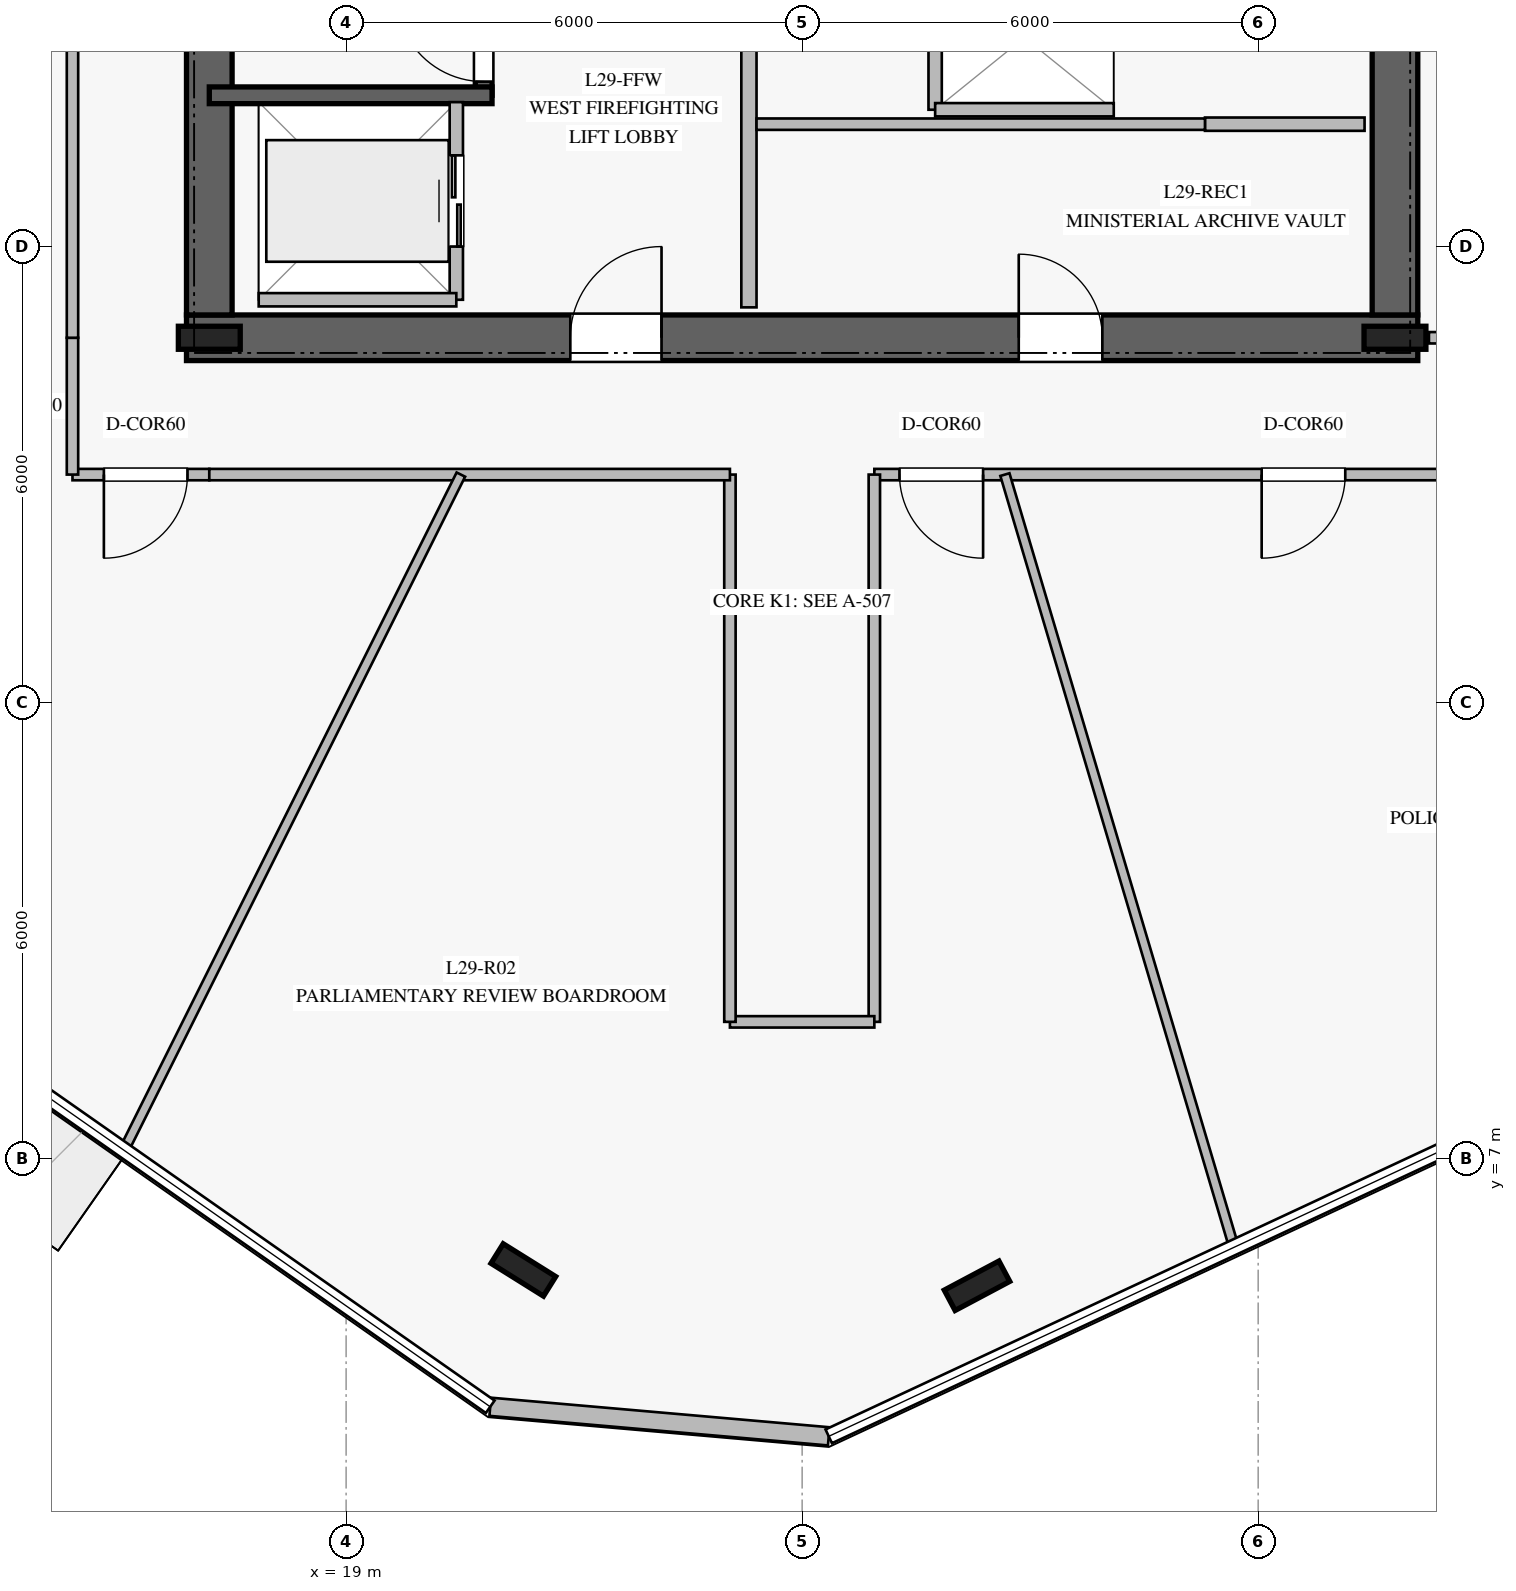
"""IFC4 building model, lengths in metres.
Left out: names, types, materials, properties, quantities, classifications, styles, units other than length and angle.
Written with IfcOpenShell. Run it as: python <this file> out.ifc"""

import sys

from ifc_helpers import new_model, si_unit, direction, frame, frame_2d, origin, origin_2d, place, context, subcontext, project, spatial, rectangle, i_section, extrude, element, fill, save


model = new_model("IFC4")
c1 = context("Model", 3, precision=1e-05, world=origin(), true_north=direction((0.0, 1.0)))
c2 = subcontext(c1, "Body", "Model", "MODEL_VIEW")
j1 = project(units=[si_unit("LENGTHUNIT", "METRE"), si_unit("PLANEANGLEUNIT", "RADIAN")], contexts=[c1])
p1 = place(None, origin())
s1 = spatial("IfcSite", under=j1, at=p1, CompositionType="ELEMENT")
p2 = place(p1, origin())
s2 = spatial("IfcBuilding", under=s1, at=p2, CompositionType="ELEMENT")
p3 = place(p2, frame((0.0, 0.0, 122.4)))
s3 = spatial("IfcBuildingStorey", under=s2, at=p3, CompositionType="ELEMENT", Elevation=122.4)
p4 = place(p3, frame((16.9, 17.8, 0.0), z_axis=(0.0, 0.0, 1.0), x_axis=(1.0, 0.0, 0.0)))
e1 = element("IfcWall", 1, at=p4, inside=s3, PredefinedType="SHEAR", context=c2, shape_type="SweptSolid", body=[
    extrude(rectangle(XDim=16.2, YDim=0.6, at=frame_2d((8.1, 0.0))), origin(), (0.0, 0.0, 1.0), 3.76),
])
p5 = place(p4, frame((5.05, 0.0, 0.0)))
e2 = element("IfcOpeningElement", 2, at=p5, cuts=e1, PredefinedType="OPENING", context=c2, shape_type="SweptSolid", body=[
    extrude(rectangle(XDim=1.2, YDim=2.25, at=frame_2d((0.6, 1.125))), frame((0.0, 0.31, 0.0), z_axis=(0.0, -1.0, 0.0), x_axis=(1.0, 0.0, 0.0)), (0.0, 0.0, 1.0), 0.62),
])
p6 = place(p4, frame((10.95, 0.0, 0.0)))
e3 = element("IfcOpeningElement", 3, at=p6, cuts=e1, PredefinedType="OPENING", context=c2, shape_type="SweptSolid", body=[
    extrude(rectangle(XDim=1.1, YDim=2.2, at=frame_2d((0.55, 1.1))), frame((0.0, 0.31, 0.0), z_axis=(0.0, -1.0, 0.0), x_axis=(1.0, 0.0, 0.0)), (0.0, 0.0, 1.0), 0.62),
])
p7 = place(p3, frame((17.2, 31.9, 0.0), z_axis=(0.0, 0.0, 1.0), x_axis=(0.0, -1.0, 0.0)))
e4 = element("IfcWall", 4, at=p7, inside=s3, PredefinedType="SHEAR", context=c2, shape_type="SweptSolid", body=[
    extrude(rectangle(XDim=13.8, YDim=0.6, at=frame_2d((6.9, 0.0))), origin(), (0.0, 0.0, 1.0), 3.76),
])
p8 = place(p7, frame((2.05, 0.0, 0.0)))
e5 = element("IfcOpeningElement", 5, at=p8, cuts=e4, PredefinedType="OPENING", context=c2, shape_type="SweptSolid", body=[
    extrude(rectangle(XDim=1.5, YDim=2.2, at=frame_2d((0.75, 1.1))), frame((0.0, 0.31, 0.0), z_axis=(0.0, -1.0, 0.0), x_axis=(1.0, 0.0, 0.0)), (0.0, 0.0, 1.0), 0.62),
])
p9 = place(p3, frame((32.8, 18.1, 0.0), z_axis=(0.0, 0.0, 1.0), x_axis=(0.0, 1.0, 0.0)))
e6 = element("IfcWall", 6, at=p9, inside=s3, PredefinedType="SHEAR", context=c2, shape_type="SweptSolid", body=[
    extrude(rectangle(XDim=13.8, YDim=0.6, at=frame_2d((6.9, 0.0))), origin(), (0.0, 0.0, 1.0), 3.76),
])
for number, where, z_axis, x_axis in (
    (7, (17.2, 17.8, 0.0), (0.0, 0.0, 1.0), (1.0, 0.0, 0.0)),
    (8, (32.8, 17.8, 0.0), (0.0, 0.0, 1.0), (1.0, 0.0, 0.0)),
):
    element("IfcColumn", number, at=place(p3, frame(where, z_axis=z_axis, x_axis=x_axis)), inside=s3, PredefinedType="COLUMN", context=c2, shape_type="SweptSolid", body=[
        extrude(i_section(OverallWidth=0.303, OverallDepth=0.814, WebThickness=0.021, FlangeThickness=0.04, at=origin_2d()), origin(), (0.0, 0.0, 1.0), 4.0),
    ])
p10 = place(p3, frame((20.81, 20.99, 0.0), z_axis=(0.0, 0.0, 1.0), x_axis=(0.0, 1.0, 0.0)))
e9 = element("IfcWall", 9, at=p10, inside=s3, PredefinedType="SOLIDWALL", context=c2, shape_type="SweptSolid", body=[
    extrude(rectangle(XDim=7.22, YDim=0.22, at=frame_2d((3.61, 0.0))), origin(), (0.0, 0.0, 1.0), 3.76),
])
p11 = place(p10, frame((0.18, 0.0, 0.0)))
e10 = element("IfcOpeningElement", 10, at=p11, cuts=e9, PredefinedType="OPENING", context=c2, shape_type="SweptSolid", body=[
    extrude(rectangle(XDim=1.15, YDim=2.2, at=frame_2d((0.575, 1.1))), frame((0.0, 0.12, 0.0), z_axis=(0.0, -1.0, 0.0), x_axis=(1.0, 0.0, 0.0)), (0.0, 0.0, 1.0), 0.24),
])
p12 = place(p3, frame((17.2, 20.99, 0.0), z_axis=(0.0, 0.0, 1.0), x_axis=(1.0, 0.0, 0.0)))
e11 = element("IfcWall", 11, at=p12, inside=s3, PredefinedType="SOLIDWALL", context=c2, shape_type="SweptSolid", body=[
    extrude(rectangle(XDim=3.72, YDim=0.22, at=frame_2d((1.86, 0.0))), origin(), (0.0, 0.0, 1.0), 3.76),
])
for number, where, z_axis, x_axis in (
    (12, (21.332, 5.536, 0.0), (0.0, 0.0, 1.0), (-0.848, 0.53, 0.0)),
    (13, (27.301, 5.328, 0.0), (0.0, 0.0, 1.0), (0.883, 0.469, 0.0)),
):
    element("IfcColumn", number, at=place(p3, frame(where, z_axis=z_axis, x_axis=x_axis)), inside=s3, PredefinedType="COLUMN", context=c2, shape_type="SweptSolid", body=[
        extrude(i_section(OverallWidth=0.303, OverallDepth=0.814, WebThickness=0.021, FlangeThickness=0.04, at=origin_2d()), origin(), (0.0, 0.0, 1.0), 4.0),
    ])
p13 = place(p3, frame((20.896, 3.736, 0.0), z_axis=(0.0, 0.0, 1.0), x_axis=(0.996204852099, -0.087039603938, 0.0)))
e14 = element("IfcWall", 14, at=p13, inside=s3, PredefinedType="STANDARD", context=c2, shape_type="SweptSolid", body=[
    extrude(rectangle(XDim=4.471, YDim=0.24, at=frame_2d((2.236, 0.0))), origin(), (0.0, 0.0, 1.0), 3.76),
])
p14 = place(p3, frame((24.3, 18.2, 0.0), z_axis=(0.0, 0.0, 1.0), x_axis=(0.0, 1.0, 0.0)))
e15 = element("IfcWall", 15, at=p14, inside=s3, PredefinedType="PARTITIONING", context=c2, shape_type="SweptSolid", body=[
    extrude(rectangle(XDim=5.15, YDim=0.2, at=frame_2d((2.575, 0.0))), origin(), (0.0, 0.0, 1.0), 3.76),
])
p15 = place(p3, frame((30.3, 20.61, 0.0), z_axis=(0.0, 0.0, 1.0), x_axis=(1.0, 0.0, 0.0)))
e16 = element("IfcWall", 16, at=p15, inside=s3, PredefinedType="PARTITIONING", context=c2, shape_type="SweptSolid", body=[
    extrude(rectangle(XDim=2.1, YDim=0.175, at=frame_2d((1.05, 0.0))), origin(), (0.0, 0.0, 1.0), 3.76),
])
p16 = place(p3, frame((24.4, 20.61, 0.0), z_axis=(0.0, 0.0, 1.0), x_axis=(1.0, 0.0, 0.0)))
e17 = element("IfcWall", 17, at=p16, inside=s3, PredefinedType="PARTITIONING", context=c2, shape_type="SweptSolid", body=[
    extrude(rectangle(XDim=5.9, YDim=0.15, at=frame_2d((2.95, 0.0))), origin(), (0.0, 0.0, 1.0), 3.76),
])
p17 = place(p3, frame((26.75, 20.8, 0.0), z_axis=(0.0, 0.0, 1.0), x_axis=(0.0, 1.0, 0.0)))
e18 = element("IfcWall", 18, at=p17, inside=s3, PredefinedType="PARTITIONING", context=c2, shape_type="SweptSolid", body=[
    extrude(rectangle(XDim=1.9, YDim=0.175, at=frame_2d((0.95, 0.0))), origin(), (0.0, 0.0, 1.0), 3.76),
])
p18 = place(p3, frame((26.75, 20.8, 0.0), z_axis=(0.0, 0.0, 1.0), x_axis=(1.0, 0.0, 0.0)))
e19 = element("IfcWall", 19, at=p18, inside=s3, PredefinedType="PARTITIONING", context=c2, shape_type="SweptSolid", body=[
    extrude(rectangle(XDim=2.35, YDim=0.175, at=frame_2d((1.175, 0.0))), origin(), (0.0, 0.0, 1.0), 3.76),
])
p19 = place(p3, frame((20.45, 18.3, 0.0), z_axis=(0.0, 0.0, 1.0), x_axis=(0.0, 1.0, 0.0)))
e20 = element("IfcWall", 20, at=p19, inside=s3, PredefinedType="PARTITIONING", context=c2, shape_type="SweptSolid", body=[
    extrude(rectangle(XDim=2.6, YDim=0.175, at=frame_2d((1.3, 0.0))), origin(), (0.0, 0.0, 1.0), 3.76),
])
p20 = place(p19, frame((0.7, 0.0, 0.0)))
e21 = element("IfcOpeningElement", 21, at=p20, cuts=e20, PredefinedType="OPENING", context=c2, shape_type="SweptSolid", body=[
    extrude(rectangle(XDim=1.2, YDim=2.2, at=frame_2d((0.6, 1.1))), frame((0.0, 0.098, 0.0), z_axis=(0.0, -1.0, 0.0), x_axis=(1.0, 0.0, 0.0)), (0.0, 0.0, 1.0), 0.195),
])
p21 = place(p3, frame((17.85, 18.3, 0.0), z_axis=(0.0, 0.0, 1.0), x_axis=(1.0, 0.0, 0.0)))
e22 = element("IfcWall", 22, at=p21, inside=s3, PredefinedType="PARTITIONING", context=c2, shape_type="SweptSolid", body=[
    extrude(rectangle(XDim=2.6, YDim=0.175, at=frame_2d((1.3, 0.0))), origin(), (0.0, 0.0, 1.0), 3.76),
])
p22 = place(p3, frame((17.2, 16.0, 0.0), z_axis=(0.0, 0.0, 1.0), x_axis=(-1.0, 0.0, 0.0)))
e23 = element("IfcWall", 23, at=p22, inside=s3, PredefinedType="PARTITIONING", context=c2, shape_type="SweptSolid", body=[
    extrude(rectangle(XDim=1.8, YDim=0.15, at=frame_2d((0.9, 0.0))), origin(), (0.0, 0.0, 1.0), 3.36),
])
p23 = place(p22, frame((0.287, 0.0, 0.0)))
e24 = element("IfcOpeningElement", 24, at=p23, cuts=e23, PredefinedType="OPENING", context=c2, shape_type="SweptSolid", body=[
    extrude(rectangle(XDim=1.1, YDim=2.2, at=frame_2d((0.55, 1.1))), frame((0.0, 0.085, 0.0), z_axis=(0.0, -1.0, 0.0), x_axis=(1.0, 0.0, 0.0)), (0.0, 0.0, 1.0), 0.17),
])
p24 = place(p3, frame((15.4, 16.0, 0.0), z_axis=(0.0, 0.0, 1.0), x_axis=(0.0, 1.0, 0.0)))
e25 = element("IfcWall", 25, at=p24, inside=s3, PredefinedType="PARTITIONING", context=c2, shape_type="SweptSolid", body=[
    extrude(rectangle(XDim=1.8, YDim=0.15, at=frame_2d((0.9, 0.0))), origin(), (0.0, 0.0, 1.0), 3.21),
])
p25 = place(p3, frame((15.4, 17.8, 0.0), z_axis=(0.0, 0.0, 1.0), x_axis=(0.0, 1.0, 0.0)))
e26 = element("IfcWall", 26, at=p25, inside=s3, PredefinedType="PARTITIONING", context=c2, shape_type="SweptSolid", body=[
    extrude(rectangle(XDim=6.25, YDim=0.15, at=frame_2d((3.125, 0.0))), origin(), (0.0, 0.0, 1.0), 3.21),
])
p26 = place(p3, frame((33.247, 17.8, 0.0), z_axis=(0.0, 0.0, 1.0), x_axis=(1.0, 0.0, 0.0)))
e27 = element("IfcWall", 27, at=p26, inside=s3, PredefinedType="PARTITIONING", context=c2, shape_type="SweptSolid", body=[
    extrude(rectangle(XDim=7.953, YDim=0.15, at=frame_2d((3.977, 0.0))), origin(), (0.0, 0.0, 1.0), 3.05),
])
p27 = place(p3, frame((41.2, 16.0, 0.0), z_axis=(0.0, 0.0, 1.0), x_axis=(-1.0, 0.0, 0.0)))
e28 = element("IfcWall", 28, at=p27, inside=s3, PredefinedType="PARTITIONING", context=c2, shape_type="SweptSolid", body=[
    extrude(rectangle(XDim=15.25, YDim=0.15, at=frame_2d((7.625, 0.0))), origin(), (0.0, 0.0, 1.0), 3.21),
])
p28 = place(p27, frame((13.819, 0.0, 0.0)))
e29 = element("IfcOpeningElement", 29, at=p28, cuts=e28, PredefinedType="OPENING", context=c2, shape_type="SweptSolid", body=[
    extrude(rectangle(XDim=1.1, YDim=2.2, at=frame_2d((0.55, 1.1))), frame((0.0, 0.085, 0.0), z_axis=(0.0, -1.0, 0.0), x_axis=(1.0, 0.0, 0.0)), (0.0, 0.0, 1.0), 0.17),
])
p29 = place(p27, frame((9.054, 0.0, 0.0)))
e30 = element("IfcOpeningElement", 30, at=p29, cuts=e28, PredefinedType="OPENING", context=c2, shape_type="SweptSolid", body=[
    extrude(rectangle(XDim=1.1, YDim=2.2, at=frame_2d((0.55, 1.1))), frame((0.0, 0.085, 0.0), z_axis=(0.0, -1.0, 0.0), x_axis=(1.0, 0.0, 0.0)), (0.0, 0.0, 1.0), 0.17),
])
p30 = place(p3, frame((25.95, 16.0, 0.0), z_axis=(0.0, 0.0, 1.0), x_axis=(0.0, -1.0, 0.0)))
e31 = element("IfcWall", 31, at=p30, inside=s3, PredefinedType="PARTITIONING", context=c2, shape_type="SweptSolid", body=[
    extrude(rectangle(XDim=7.2, YDim=0.15, at=frame_2d((3.6, 0.0))), origin(), (0.0, 0.0, 1.0), 3.36),
])
p31 = place(p3, frame((25.95, 8.8, 0.0), z_axis=(0.0, 0.0, 1.0), x_axis=(-1.0, 0.0, 0.0)))
e32 = element("IfcWall", 32, at=p31, inside=s3, PredefinedType="PARTITIONING", context=c2, shape_type="SweptSolid", body=[
    extrude(rectangle(XDim=1.9, YDim=0.15, at=frame_2d((0.95, 0.0))), origin(), (0.0, 0.0, 1.0), 3.76),
])
p32 = place(p3, frame((24.05, 8.8, 0.0), z_axis=(0.0, 0.0, 1.0), x_axis=(0.0, 1.0, 0.0)))
e33 = element("IfcWall", 33, at=p32, inside=s3, PredefinedType="PARTITIONING", context=c2, shape_type="SweptSolid", body=[
    extrude(rectangle(XDim=7.2, YDim=0.15, at=frame_2d((3.6, 0.0))), origin(), (0.0, 0.0, 1.0), 3.36),
])
p33 = place(p3, frame((24.05, 16.0, 0.0), z_axis=(0.0, 0.0, 1.0), x_axis=(-1.0, 0.0, 0.0)))
e34 = element("IfcWall", 34, at=p33, inside=s3, PredefinedType="PARTITIONING", context=c2, shape_type="SweptSolid", body=[
    extrude(rectangle(XDim=6.85, YDim=0.15, at=frame_2d((3.425, 0.0))), origin(), (0.0, 0.0, 1.0), 3.21),
])
p34 = place(p3, frame((20.51, 16.0, 0.0), z_axis=(0.0, 0.0, 1.0), x_axis=(-0.446366409245, -0.894850282839, 0.0)))
e35 = element("IfcWall", 35, at=p34, inside=s3, PredefinedType="PARTITIONING", context=c2, shape_type="SweptSolid", body=[
    extrude(rectangle(XDim=9.916, YDim=0.125, at=frame_2d((4.958, 0.0))), origin(), (0.0, 0.0, 1.0), 3.16),
])
p35 = place(p3, frame((27.668, 16.0, 0.0), z_axis=(0.0, 0.0, 1.0), x_axis=(0.284232016895, -0.95875552701, 0.0)))
e36 = element("IfcWall", 36, at=p35, inside=s3, PredefinedType="PARTITIONING", context=c2, shape_type="SweptSolid", body=[
    extrude(rectangle(XDim=10.586, YDim=0.125, at=frame_2d((5.293, 0.0))), origin(), (0.0, 0.0, 1.0), 3.16),
])
p36 = place(p11, origin())
e37 = element("IfcDoor", 37, at=p36, inside=s3, OperationType="SINGLE_SWING_RIGHT", PredefinedType="DOOR", context=c2, shape_type="SweptSolid", body=[
    extrude(rectangle(XDim=1.15, YDim=2.2, at=frame_2d((0.575, 1.1))), frame((0.0, 0.025, 0.0), z_axis=(0.0, -1.0, 0.0), x_axis=(1.0, 0.0, 0.0)), (0.0, 0.0, 1.0), 0.05),
])
fill(e10, e37)
p37 = place(p5, origin())
e38 = element("IfcDoor", 38, at=p37, inside=s3, OperationType="SINGLE_SWING_RIGHT", PredefinedType="DOOR", context=c2, shape_type="SweptSolid", body=[
    extrude(rectangle(XDim=1.2, YDim=2.25, at=frame_2d((0.6, 1.125))), frame((0.0, 0.025, 0.0), z_axis=(0.0, -1.0, 0.0), x_axis=(1.0, 0.0, 0.0)), (0.0, 0.0, 1.0), 0.05),
])
fill(e2, e38)
p38 = place(p6, origin())
e39 = element("IfcDoor", 39, at=p38, inside=s3, OperationType="SINGLE_SWING_LEFT", PredefinedType="DOOR", context=c2, shape_type="SweptSolid", body=[
    extrude(rectangle(XDim=1.1, YDim=2.2, at=frame_2d((0.55, 1.1))), frame((0.0, 0.025, 0.0), z_axis=(0.0, -1.0, 0.0), x_axis=(1.0, 0.0, 0.0)), (0.0, 0.0, 1.0), 0.05),
])
fill(e3, e39)
p39 = place(p20, origin())
e40 = element("IfcDoor", 40, at=p39, inside=s3, OperationType="DOUBLE_DOOR_SLIDING", PredefinedType="DOOR", context=c2, shape_type="SweptSolid", body=[
    extrude(rectangle(XDim=1.2, YDim=2.2, at=frame_2d((0.6, 1.1))), frame((0.0, 0.025, 0.0), z_axis=(0.0, -1.0, 0.0), x_axis=(1.0, 0.0, 0.0)), (0.0, 0.0, 1.0), 0.05),
])
fill(e21, e40)
p40 = place(p23, origin())
e41 = element("IfcDoor", 41, at=p40, inside=s3, OperationType="SINGLE_SWING_RIGHT", PredefinedType="DOOR", context=c2, shape_type="SweptSolid", body=[
    extrude(rectangle(XDim=1.1, YDim=2.2, at=frame_2d((0.55, 1.1))), frame((0.0, 0.025, 0.0), z_axis=(0.0, -1.0, 0.0), x_axis=(1.0, 0.0, 0.0)), (0.0, 0.0, 1.0), 0.05),
])
fill(e24, e41)
p41 = place(p28, origin())
e42 = element("IfcDoor", 42, at=p41, inside=s3, OperationType="SINGLE_SWING_LEFT", PredefinedType="DOOR", context=c2, shape_type="SweptSolid", body=[
    extrude(rectangle(XDim=1.1, YDim=2.2, at=frame_2d((0.55, 1.1))), frame((0.0, 0.025, 0.0), z_axis=(0.0, -1.0, 0.0), x_axis=(1.0, 0.0, 0.0)), (0.0, 0.0, 1.0), 0.05),
])
fill(e29, e42)
p42 = place(p29, origin())
e43 = element("IfcDoor", 43, at=p42, inside=s3, OperationType="SINGLE_SWING_RIGHT", PredefinedType="DOOR", context=c2, shape_type="SweptSolid", body=[
    extrude(rectangle(XDim=1.1, YDim=2.2, at=frame_2d((0.55, 1.1))), frame((0.0, 0.025, 0.0), z_axis=(0.0, -1.0, 0.0), x_axis=(1.0, 0.0, 0.0)), (0.0, 0.0, 1.0), 0.05),
])
fill(e30, e43)
save(model, sys.argv[1])
